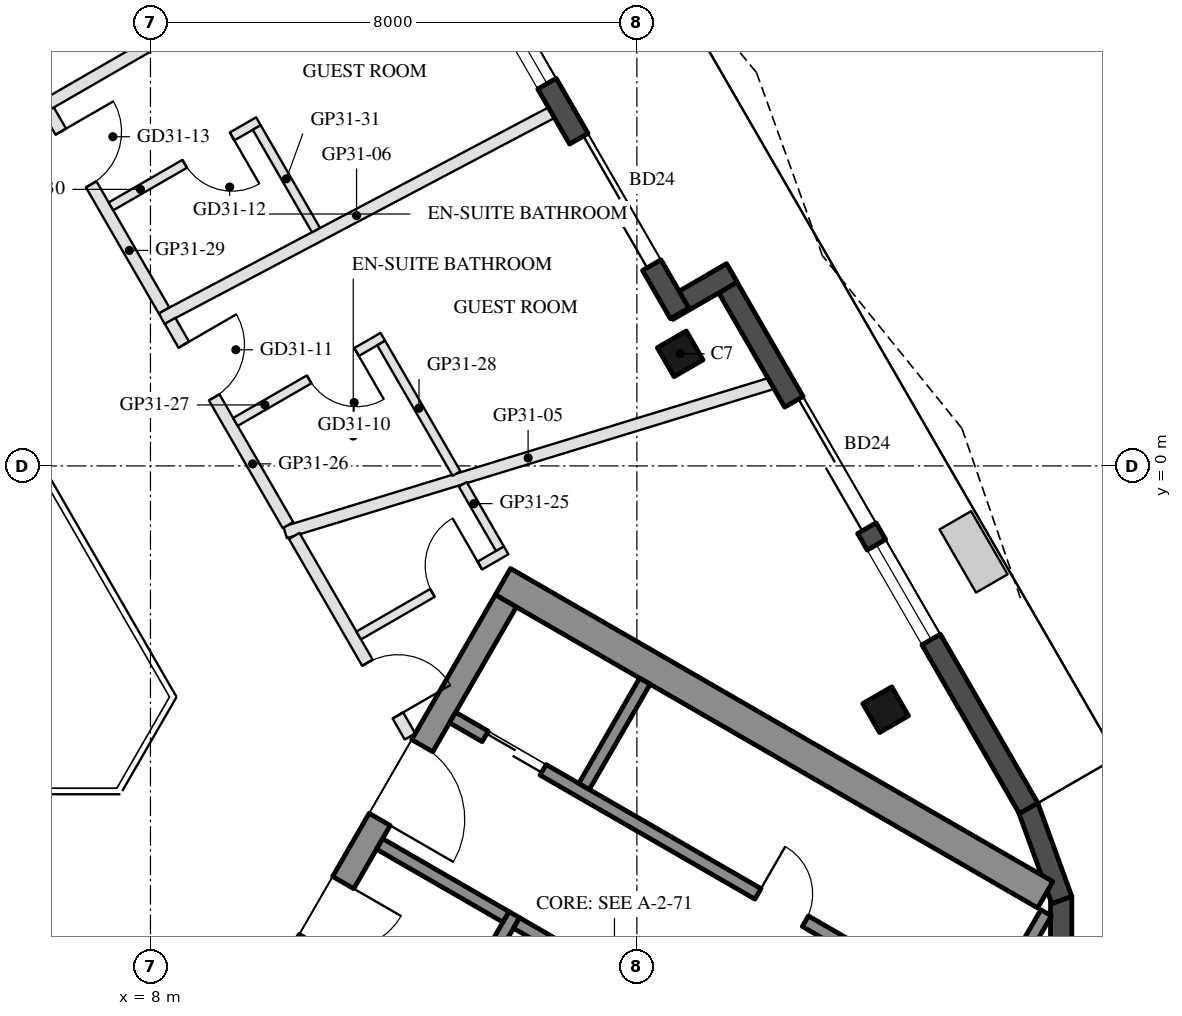
"""IFC4 building model, lengths in metres.
Left out: names, types, materials, properties, quantities, classifications, styles, units other than length and angle.
Written with IfcOpenShell. Run it as: python <this file> out.ifc"""

import sys

from ifc_helpers import new_model, si_unit, direction, frame, frame_2d, origin, origin_2d, place, context, subcontext, project, spatial, rectangle, hollow_rectangle, extrude, boolean, halfspace, element, fill, save


model = new_model("IFC4")
c1 = context("Model", 3, precision=1e-05, world=origin(), true_north=direction((0.0, 1.0)))
c2 = subcontext(c1, "Body", "Model", "MODEL_VIEW")
j1 = project(units=[si_unit("LENGTHUNIT", "METRE"), si_unit("PLANEANGLEUNIT", "RADIAN")], contexts=[c1])
p1 = place(None, origin())
s1 = spatial("IfcSite", under=j1, at=p1, CompositionType="ELEMENT")
p2 = place(p1, origin())
s2 = spatial("IfcBuilding", under=s1, at=p2, CompositionType="ELEMENT")
p3 = place(p2, frame((0.0, 0.0, 305.9)))
s3 = spatial("IfcBuildingStorey", under=s2, at=p3, CompositionType="ELEMENT", Elevation=305.9)
p4 = place(p3, frame((20.091, -4.01, 0.0), z_axis=(0.0, 0.0, 1.0), x_axis=(-0.5, 0.866025403784, 0.0)))
e1 = element("IfcColumn", 1, at=p4, inside=s3, PredefinedType="COLUMN", context=c2, shape_type="SweptSolid", body=[
    boolean("DIFFERENCE", extrude(hollow_rectangle(XDim=0.55, YDim=0.55, WallThickness=0.025, at=origin_2d()), origin(), (0.0, 0.0, 1.0), 3.7), halfspace(frame((0.0, 0.0, 3.66), z_axis=(0.0, 0.0, 1.0), x_axis=(1.0, 0.0, 0.0)), False)),
])
p5 = place(p3, frame((16.711, 1.844, 0.0), z_axis=(0.0, 0.0, 1.0), x_axis=(-0.5, 0.866025403784, 0.0)))
e2 = element("IfcColumn", 2, at=p5, inside=s3, PredefinedType="COLUMN", context=c2, shape_type="SweptSolid", body=[
    boolean("DIFFERENCE", extrude(hollow_rectangle(XDim=0.55, YDim=0.55, WallThickness=0.025, at=origin_2d()), origin(), (0.0, 0.0, 1.0), 3.7), halfspace(frame((0.0, 0.0, 3.666), z_axis=(0.0, 0.0, 1.0), x_axis=(1.0, 0.0, 0.0)), False)),
])
for number, where, z_axis, x_axis in (
    (3, (22.977, -8.714, 0.0), (0.0, 0.0, 1.0), (0.0, 1.0, 0.0)),
    (4, (22.988, -7.14, 0.0), (0.0, 0.0, 1.0), (-0.342, 0.94, 0.0)),
):
    element("IfcWall", number, at=place(p3, frame(where, z_axis=z_axis, x_axis=x_axis)), inside=s3, PredefinedType="SOLIDWALL", context=c2, shape_type="SweptSolid", body=[
        extrude(rectangle(XDim=1.634, YDim=0.35, at=frame_2d((0.817, 0.0))), origin(), (0.0, 0.0, 1.0), 3.55),
    ])
p6 = place(p3, frame((22.442, -5.632, 0.0), z_axis=(0.0, 0.0, 1.0), x_axis=(-0.499983205548, 0.866035099848, 0.0)))
e5 = element("IfcWall", 5, at=p6, inside=s3, PredefinedType="SOLIDWALL", context=c2, shape_type="SweptSolid", body=[
    extrude(rectangle(XDim=10.239, YDim=0.35, at=frame_2d((5.12, 0.0))), origin(), (0.0, 0.0, 1.0), 3.55),
])
p7 = place(p6, frame((5.32, 0.0, 0.0)))
e6 = element("IfcOpeningElement", 6, at=p7, cuts=e5, PredefinedType="OPENING", context=c2, shape_type="SweptSolid", body=[
    extrude(rectangle(XDim=2.4, YDim=2.4, at=frame_2d((1.2, 1.2))), frame((0.0, 0.185, 0.0), z_axis=(0.0, -1.0, 0.0), x_axis=(1.0, 0.0, 0.0)), (0.0, 0.0, 1.0), 0.37),
])
p8 = place(p6, frame((3.205, 0.0, 0.3)))
e7 = element("IfcOpeningElement", 7, at=p8, cuts=e5, PredefinedType="OPENING", context=c2, shape_type="SweptSolid", body=[
    extrude(rectangle(XDim=1.8, YDim=2.65, at=frame_2d((0.9, 1.325))), frame((0.0, 0.185, 0.0), z_axis=(0.0, -1.0, 0.0), x_axis=(1.0, 0.0, 0.0)), (0.0, 0.0, 1.0), 0.37),
])
p9 = place(p3, frame((17.562, 3.172, 0.0), z_axis=(0.0, 0.0, 1.0), x_axis=(-0.866005645448, -0.500034220881, 0.0)))
e8 = element("IfcWall", 8, at=p9, inside=s3, PredefinedType="SOLIDWALL", context=c2, shape_type="SweptSolid", body=[
    extrude(rectangle(XDim=1.22, YDim=0.35, at=frame_2d((0.61, 0.0))), origin(), (0.0, 0.0, 1.0), 3.55),
])
p10 = place(p3, frame((16.703, 2.509, 0.0), z_axis=(0.0, 0.0, 1.0), x_axis=(-0.499975351079, 0.866039634378, 0.0)))
e9 = element("IfcWall", 9, at=p10, inside=s3, PredefinedType="SOLIDWALL", context=c2, shape_type="SweptSolid", body=[
    extrude(rectangle(XDim=5.599, YDim=0.35, at=frame_2d((2.799, 0.0))), origin(), (0.0, 0.0, 1.0), 3.55),
])
p11 = place(p10, frame((0.917, 0.0, 0.0)))
e10 = element("IfcOpeningElement", 10, at=p11, cuts=e9, PredefinedType="OPENING", context=c2, shape_type="SweptSolid", body=[
    extrude(rectangle(XDim=2.4, YDim=2.4, at=frame_2d((1.2, 1.2))), frame((0.0, 0.185, 0.0), z_axis=(0.0, -1.0, 0.0), x_axis=(1.0, 0.0, 0.0)), (0.0, 0.0, 1.0), 0.37),
])
p12 = place(p10, frame((4.363, 0.0, 0.3)))
e11 = element("IfcOpeningElement", 11, at=p12, cuts=e9, PredefinedType="OPENING", context=c2, shape_type="SweptSolid", body=[
    extrude(rectangle(XDim=0.9, YDim=2.65, at=frame_2d((0.45, 1.325))), frame((0.0, 0.185, 0.0), z_axis=(0.0, -1.0, 0.0), x_axis=(1.0, 0.0, 0.0)), (0.0, 0.0, 1.0), 0.37),
])
p13 = place(p3, frame((13.797, -1.903, 0.0), z_axis=(0.0, 0.0, 1.0), x_axis=(0.866027279078, -0.499996751883, 0.0)))
e12 = element("IfcWall", 12, at=p13, inside=s3, PredefinedType="SHEAR", context=c2, shape_type="SweptSolid", body=[
    extrude(rectangle(XDim=10.298, YDim=0.5, at=frame_2d((5.149, 0.0))), origin(), (0.0, 0.0, 1.0), 3.5),
])
p14 = place(p3, frame((8.845, -10.88, 0.0), z_axis=(0.0, 0.0, 1.0), x_axis=(0.500004234368, 0.866022959057, 0.0)))
e13 = element("IfcWall", 13, at=p14, inside=s3, PredefinedType="SHEAR", context=c2, shape_type="SweptSolid", body=[
    extrude(rectangle(XDim=10.0, YDim=0.4, at=frame_2d((5.0, 0.0))), origin(), (0.0, 0.0, 1.0), 3.5),
])
p15 = place(p14, frame((3.55, 0.0, 0.0)))
e14 = element("IfcOpeningElement", 14, at=p15, cuts=e13, PredefinedType="OPENING", context=c2, shape_type="SweptSolid", body=[
    extrude(rectangle(XDim=1.1, YDim=2.1, at=frame_2d((0.55, 1.05))), frame((0.0, 0.21, 0.0), z_axis=(0.0, -1.0, 0.0), x_axis=(1.0, 0.0, 0.0)), (0.0, 0.0, 1.0), 0.42),
])
p16 = place(p14, frame((5.85, 0.0, 0.0)))
e15 = element("IfcOpeningElement", 15, at=p16, cuts=e13, PredefinedType="OPENING", context=c2, shape_type="SweptSolid", body=[
    extrude(rectangle(XDim=1.4, YDim=2.1, at=frame_2d((0.7, 1.05))), frame((0.0, 0.21, 0.0), z_axis=(0.0, -1.0, 0.0), x_axis=(1.0, 0.0, 0.0)), (0.0, 0.0, 1.0), 0.42),
])
p17 = place(p3, frame((12.583, -9.805, 0.0), z_axis=(0.0, 0.0, 1.0), x_axis=(0.49994636267, 0.866056369097, 0.0)))
e16 = element("IfcWall", 16, at=p17, inside=s3, PredefinedType="SHEAR", context=c2, shape_type="SweptSolid", body=[
    extrude(rectangle(XDim=2.8, YDim=0.2, at=frame_2d((1.4, 0.0))), origin(), (0.0, 0.0, 1.0), 3.5),
])
p18 = place(p17, frame((0.7, 0.0, 0.0)))
e17 = element("IfcOpeningElement", 17, at=p18, cuts=e16, PredefinedType="OPENING", context=c2, shape_type="SweptSolid", body=[
    extrude(rectangle(XDim=1.2, YDim=2.1, at=frame_2d((0.6, 1.05))), frame((0.0, 0.11, 0.0), z_axis=(0.0, -1.0, 0.0), x_axis=(1.0, 0.0, 0.0)), (0.0, 0.0, 1.0), 0.22),
])
p19 = place(p3, frame((11.768, -6.217, 0.0), z_axis=(0.0, 0.0, 1.0), x_axis=(0.866050077142, -0.499957262057, 0.0)))
e18 = element("IfcWall", 18, at=p19, inside=s3, PredefinedType="SHEAR", context=c2, shape_type="SweptSolid", body=[
    extrude(rectangle(XDim=2.4, YDim=0.2, at=frame_2d((1.2, 0.0))), origin(), (0.0, 0.0, 1.0), 3.5),
])
p20 = place(p3, frame((14.02, -7.517, 0.0), z_axis=(0.0, 0.0, 1.0), x_axis=(0.866034573852, -0.49998411664, 0.0)))
e19 = element("IfcWall", 19, at=p20, inside=s3, PredefinedType="SHEAR", context=c2, shape_type="SweptSolid", body=[
    extrude(rectangle(XDim=2.8, YDim=0.2, at=frame_2d((1.4, 0.0))), origin(), (0.0, 0.0, 1.0), 3.5),
])
p21 = place(p3, frame((12.968, -4.138, 0.0), z_axis=(0.0, 0.0, 1.0), x_axis=(0.866028328073, -0.49999493495, 0.0)))
e20 = element("IfcWall", 20, at=p21, inside=s3, PredefinedType="SHEAR", context=c2, shape_type="SweptSolid", body=[
    extrude(rectangle(XDim=10.16, YDim=0.2, at=frame_2d((5.08, 0.0))), origin(), (0.0, 0.0, 1.0), 3.5),
])
p22 = place(p21, frame((0.62, 0.0, 0.0)))
e21 = element("IfcOpeningElement", 21, at=p22, cuts=e20, PredefinedType="OPENING", context=c2, shape_type="SweptSolid", body=[
    extrude(rectangle(XDim=1.1, YDim=2.1, at=frame_2d((0.55, 1.05))), frame((0.0, 0.11, 0.0), z_axis=(0.0, -1.0, 0.0), x_axis=(1.0, 0.0, 0.0)), (0.0, 0.0, 1.0), 0.22),
])
p23 = place(p21, frame((5.8, 0.0, 0.0)))
e22 = element("IfcOpeningElement", 22, at=p23, cuts=e20, PredefinedType="OPENING", context=c2, shape_type="SweptSolid", body=[
    extrude(rectangle(XDim=0.9, YDim=2.1, at=frame_2d((0.45, 1.05))), frame((0.0, 0.11, 0.0), z_axis=(0.0, -1.0, 0.0), x_axis=(1.0, 0.0, 0.0)), (0.0, 0.0, 1.0), 0.22),
])
for number, where, z_axis, x_axis in (
    (23, (15.131, -5.272, 0.0), (0.0, 0.0, 1.0), (0.5, 0.866, 0.0)),
    (24, (21.73, -9.082, 0.0), (0.0, 0.0, 1.0), (0.5, 0.866, 0.0)),
):
    element("IfcWall", number, at=place(p3, frame(where, z_axis=z_axis, x_axis=x_axis)), inside=s3, PredefinedType="SHEAR", context=c2, shape_type="SweptSolid", body=[
        extrude(rectangle(XDim=2.0, YDim=0.2, at=frame_2d((1.0, 0.0))), origin(), (0.0, 0.0, 1.0), 3.5),
    ])
p24 = place(p3, frame((18.206, 1.355, 0.0), z_axis=(0.0, 0.0, 1.0), x_axis=(-0.956150885444, -0.292874519658, 0.0)))
e25 = element("IfcWall", 25, at=p24, inside=s3, PredefinedType="PARTITIONING", context=c2, shape_type="SweptSolid", body=[
    extrude(rectangle(XDim=8.358, YDim=0.2, at=frame_2d((4.179, 0.0))), origin(), (0.0, 0.0, 1.0), 3.1),
])
p25 = place(p3, frame((14.595, 5.81, 0.0), z_axis=(0.0, 0.0, 1.0), x_axis=(-0.884286267242, -0.46694517619, 0.0)))
e26 = element("IfcWall", 26, at=p25, inside=s3, PredefinedType="PARTITIONING", context=c2, shape_type="SweptSolid", body=[
    extrude(rectangle(XDim=7.25, YDim=0.2, at=frame_2d((3.625, 0.0))), origin(), (0.0, 0.0, 1.0), 3.1),
])
p26 = place(p3, frame((13.241, 9.954, 0.0), z_axis=(0.0, 0.0, 1.0), x_axis=(-0.866028345359, -0.499994905008, 0.0)))
e27 = element("IfcWall", 27, at=p26, inside=s3, PredefinedType="PARTITIONING", context=c2, shape_type="SweptSolid", body=[
    extrude(rectangle(XDim=8.145, YDim=0.2, at=frame_2d((4.072, 0.0))), origin(), (0.0, 0.0, 1.0), 3.1),
])
p27 = place(p3, frame((10.365, -1.152, 0.0), z_axis=(0.0, 0.0, 1.0), x_axis=(0.499999897272, -0.866025463095, 0.0)))
e28 = element("IfcWall", 28, at=p27, inside=s3, PredefinedType="PARTITIONING", context=c2, shape_type="SweptSolid", body=[
    extrude(rectangle(XDim=3.809, YDim=0.2, at=frame_2d((1.904, 0.0))), origin(), (0.0, 0.0, 1.0), 3.1),
])
p28 = place(p27, frame((2.409, 0.0, 0.0)))
e29 = element("IfcOpeningElement", 29, at=p28, cuts=e28, PredefinedType="OPENING", context=c2, shape_type="SweptSolid", body=[
    extrude(rectangle(XDim=1.0, YDim=2.1, at=frame_2d((0.5, 1.05))), frame((0.0, 0.11, 0.0), z_axis=(0.0, -1.0, 0.0), x_axis=(1.0, 0.0, 0.0)), (0.0, 0.0, 1.0), 0.22),
])
p29 = place(p3, frame((11.425, -2.789, 0.0), z_axis=(0.0, 0.0, 1.0), x_axis=(0.865996816683, 0.500049511043, 0.0)))
e30 = element("IfcWall", 30, at=p29, inside=s3, PredefinedType="PARTITIONING", context=c2, shape_type="SweptSolid", body=[
    extrude(rectangle(XDim=2.8, YDim=0.15, at=frame_2d((1.4, 0.0))), origin(), (0.0, 0.0, 1.0), 3.55),
])
p30 = place(p29, frame((1.4, 0.0, 0.0)))
e31 = element("IfcOpeningElement", 31, at=p30, cuts=e30, PredefinedType="OPENING", context=c2, shape_type="SweptSolid", body=[
    extrude(rectangle(XDim=0.9, YDim=2.1, at=frame_2d((0.45, 1.05))), frame((0.0, 0.085, 0.0), z_axis=(0.0, -1.0, 0.0), x_axis=(1.0, 0.0, 0.0)), (0.0, 0.0, 1.0), 0.17),
])
p31 = place(p3, frame((13.747, -1.361, 0.0), z_axis=(0.0, 0.0, 1.0), x_axis=(-0.499941460885, 0.86605919872, 0.0)))
e32 = element("IfcWall", 32, at=p31, inside=s3, PredefinedType="PARTITIONING", context=c2, shape_type="SweptSolid", body=[
    extrude(rectangle(XDim=1.222, YDim=0.15, at=frame_2d((0.611, 0.0))), origin(), (0.0, 0.0, 1.0), 3.1),
])
p32 = place(p3, frame((8.323, 2.385, 0.0), z_axis=(0.0, 0.0, 1.0), x_axis=(0.499998569178, -0.866026229868, 0.0)))
e33 = element("IfcWall", 33, at=p32, inside=s3, PredefinedType="PARTITIONING", context=c2, shape_type="SweptSolid", body=[
    extrude(rectangle(XDim=3.878, YDim=0.2, at=frame_2d((1.939, 0.0))), origin(), (0.0, 0.0, 1.0), 3.1),
])
p33 = place(p32, frame((0.451, 0.0, 0.0)))
e34 = element("IfcOpeningElement", 34, at=p33, cuts=e33, PredefinedType="OPENING", context=c2, shape_type="SweptSolid", body=[
    extrude(rectangle(XDim=1.0, YDim=2.1, at=frame_2d((0.5, 1.05))), frame((0.0, 0.11, 0.0), z_axis=(0.0, -1.0, 0.0), x_axis=(1.0, 0.0, 0.0)), (0.0, 0.0, 1.0), 0.22),
])
p34 = place(p3, frame((11.822, 2.123, 0.0), z_axis=(0.0, 0.0, 1.0), x_axis=(-0.865996816683, -0.500049511043, 0.0)))
e35 = element("IfcWall", 35, at=p34, inside=s3, PredefinedType="PARTITIONING", context=c2, shape_type="SweptSolid", body=[
    extrude(rectangle(XDim=2.8, YDim=0.15, at=frame_2d((1.4, 0.0))), origin(), (0.0, 0.0, 1.0), 3.55),
])
p35 = place(p34, frame((0.5, 0.0, 0.0)))
e36 = element("IfcOpeningElement", 36, at=p35, cuts=e35, PredefinedType="OPENING", context=c2, shape_type="SweptSolid", body=[
    extrude(rectangle(XDim=0.9, YDim=2.1, at=frame_2d((0.45, 1.05))), frame((0.0, 0.085, 0.0), z_axis=(0.0, -1.0, 0.0), x_axis=(1.0, 0.0, 0.0)), (0.0, 0.0, 1.0), 0.17),
])
p36 = place(p3, frame((13.034, -0.125, 0.0), z_axis=(0.0, 0.0, 1.0), x_axis=(-0.499975499923, 0.866039548448, 0.0)))
e37 = element("IfcWall", 37, at=p36, inside=s3, PredefinedType="PARTITIONING", context=c2, shape_type="SweptSolid", body=[
    extrude(rectangle(XDim=2.478, YDim=0.15, at=frame_2d((1.239, 0.0))), origin(), (0.0, 0.0, 1.0), 3.55),
])
p37 = place(p3, frame((6.325, 5.845, 0.0), z_axis=(0.0, 0.0, 1.0), x_axis=(0.499971120268, -0.866042076863, 0.0)))
e38 = element("IfcWall", 38, at=p37, inside=s3, PredefinedType="PARTITIONING", context=c2, shape_type="SweptSolid", body=[
    extrude(rectangle(XDim=3.796, YDim=0.2, at=frame_2d((1.898, 0.0))), origin(), (0.0, 0.0, 1.0), 3.1),
])
p38 = place(p37, frame((0.402, 0.0, 0.0)))
e39 = element("IfcOpeningElement", 39, at=p38, cuts=e38, PredefinedType="OPENING", context=c2, shape_type="SweptSolid", body=[
    extrude(rectangle(XDim=1.0, YDim=2.1, at=frame_2d((0.5, 1.05))), frame((0.0, 0.11, 0.0), z_axis=(0.0, -1.0, 0.0), x_axis=(1.0, 0.0, 0.0)), (0.0, 0.0, 1.0), 0.22),
])
p39 = place(p3, frame((9.775, 5.668, 0.0), z_axis=(0.0, 0.0, 1.0), x_axis=(-0.865996816683, -0.500049511043, 0.0)))
e40 = element("IfcWall", 40, at=p39, inside=s3, PredefinedType="PARTITIONING", context=c2, shape_type="SweptSolid", body=[
    extrude(rectangle(XDim=2.8, YDim=0.15, at=frame_2d((1.4, 0.0))), origin(), (0.0, 0.0, 1.0), 3.1),
])
p40 = place(p39, frame((0.5, 0.0, 0.0)))
e41 = element("IfcOpeningElement", 41, at=p40, cuts=e40, PredefinedType="OPENING", context=c2, shape_type="SweptSolid", body=[
    extrude(rectangle(XDim=0.9, YDim=2.1, at=frame_2d((0.45, 1.05))), frame((0.0, 0.085, 0.0), z_axis=(0.0, -1.0, 0.0), x_axis=(1.0, 0.0, 0.0)), (0.0, 0.0, 1.0), 0.17),
])
p41 = place(p3, frame((10.722, 3.878, 0.0), z_axis=(0.0, 0.0, 1.0), x_axis=(-0.49992486272, 0.866068779967, 0.0)))
e42 = element("IfcWall", 42, at=p41, inside=s3, PredefinedType="PARTITIONING", context=c2, shape_type="SweptSolid", body=[
    extrude(rectangle(XDim=1.949, YDim=0.15, at=frame_2d((0.975, 0.0))), origin(), (0.0, 0.0, 1.0), 3.1),
])
p42 = place(p7, frame((2.4, 0.0, 0.0), z_axis=(0.0, 0.0, 1.0), x_axis=(-1.0, 0.0, 0.0)))
e43 = element("IfcDoor", 43, at=p42, inside=s3, OperationType="SLIDING_TO_LEFT", PredefinedType="DOOR", context=c2, shape_type="SweptSolid", body=[
    extrude(rectangle(XDim=2.4, YDim=2.4, at=frame_2d((1.2, 1.2))), frame((0.0, 0.025, 0.0), z_axis=(0.0, -1.0, 0.0), x_axis=(1.0, 0.0, 0.0)), (0.0, 0.0, 1.0), 0.05),
])
fill(e6, e43)
p43 = place(p8, origin())
e44 = element("IfcWindow", 44, at=p43, inside=s3, PartitioningType="SINGLE_PANEL", PredefinedType="WINDOW", context=c2, shape_type="SweptSolid", body=[
    extrude(rectangle(XDim=1.8, YDim=2.65, at=frame_2d((0.9, 1.325))), frame((0.0, 0.03, 0.0), z_axis=(0.0, -1.0, 0.0), x_axis=(1.0, 0.0, 0.0)), (0.0, 0.0, 1.0), 0.06),
])
fill(e7, e44)
p44 = place(p11, frame((2.4, 0.0, 0.0), z_axis=(0.0, 0.0, 1.0), x_axis=(-1.0, 0.0, 0.0)))
e45 = element("IfcDoor", 45, at=p44, inside=s3, OperationType="SLIDING_TO_LEFT", PredefinedType="DOOR", context=c2, shape_type="SweptSolid", body=[
    extrude(rectangle(XDim=2.4, YDim=2.4, at=frame_2d((1.2, 1.2))), frame((0.0, 0.025, 0.0), z_axis=(0.0, -1.0, 0.0), x_axis=(1.0, 0.0, 0.0)), (0.0, 0.0, 1.0), 0.05),
])
fill(e10, e45)
p45 = place(p12, origin())
e46 = element("IfcWindow", 46, at=p45, inside=s3, PartitioningType="SINGLE_PANEL", PredefinedType="WINDOW", context=c2, shape_type="SweptSolid", body=[
    extrude(rectangle(XDim=0.9, YDim=2.65, at=frame_2d((0.45, 1.325))), frame((0.0, 0.03, 0.0), z_axis=(0.0, -1.0, 0.0), x_axis=(1.0, 0.0, 0.0)), (0.0, 0.0, 1.0), 0.06),
])
fill(e11, e46)
p46 = place(p22, origin())
e47 = element("IfcDoor", 47, at=p46, inside=s3, OperationType="DOUBLE_DOOR_SLIDING", PredefinedType="DOOR", context=c2, shape_type="SweptSolid", body=[
    extrude(rectangle(XDim=1.1, YDim=2.1, at=frame_2d((0.55, 1.05))), frame((0.0, 0.025, 0.0), z_axis=(0.0, -1.0, 0.0), x_axis=(1.0, 0.0, 0.0)), (0.0, 0.0, 1.0), 0.05),
])
fill(e21, e47)
p47 = place(p23, origin())
e48 = element("IfcDoor", 48, at=p47, inside=s3, OperationType="SINGLE_SWING_LEFT", PredefinedType="DOOR", context=c2, shape_type="SweptSolid", body=[
    extrude(rectangle(XDim=0.9, YDim=2.1, at=frame_2d((0.45, 1.05))), frame((0.0, 0.025, 0.0), z_axis=(0.0, -1.0, 0.0), x_axis=(1.0, 0.0, 0.0)), (0.0, 0.0, 1.0), 0.05),
])
fill(e22, e48)
p48 = place(p15, frame((1.1, 0.0, 0.0), z_axis=(0.0, 0.0, 1.0), x_axis=(-1.0, 0.0, 0.0)))
e49 = element("IfcDoor", 49, at=p48, inside=s3, OperationType="SINGLE_SWING_LEFT", PredefinedType="DOOR", context=c2, shape_type="SweptSolid", body=[
    extrude(rectangle(XDim=1.1, YDim=2.1, at=frame_2d((0.55, 1.05))), frame((0.0, 0.025, 0.0), z_axis=(0.0, -1.0, 0.0), x_axis=(1.0, 0.0, 0.0)), (0.0, 0.0, 1.0), 0.05),
])
fill(e14, e49)
p49 = place(p16, frame((1.4, 0.0, 0.0), z_axis=(0.0, 0.0, 1.0), x_axis=(-1.0, 0.0, 0.0)))
e50 = element("IfcDoor", 50, at=p49, inside=s3, OperationType="DOUBLE_DOOR_SINGLE_SWING", PredefinedType="DOOR", context=c2, shape_type="SweptSolid", body=[
    extrude(rectangle(XDim=1.4, YDim=2.1, at=frame_2d((0.7, 1.05))), frame((0.0, 0.025, 0.0), z_axis=(0.0, -1.0, 0.0), x_axis=(1.0, 0.0, 0.0)), (0.0, 0.0, 1.0), 0.05),
])
fill(e15, e50)
p50 = place(p30, origin())
e51 = element("IfcDoor", 51, at=p50, inside=s3, OperationType="SINGLE_SWING_RIGHT", PredefinedType="DOOR", context=c2, shape_type="SweptSolid", body=[
    extrude(rectangle(XDim=0.9, YDim=2.1, at=frame_2d((0.45, 1.05))), frame((0.0, 0.025, 0.0), z_axis=(0.0, -1.0, 0.0), x_axis=(1.0, 0.0, 0.0)), (0.0, 0.0, 1.0), 0.05),
])
fill(e31, e51)
p51 = place(p28, origin())
e52 = element("IfcDoor", 52, at=p51, inside=s3, OperationType="SINGLE_SWING_RIGHT", PredefinedType="DOOR", context=c2, shape_type="SweptSolid", body=[
    extrude(rectangle(XDim=1.0, YDim=2.1, at=frame_2d((0.5, 1.05))), frame((0.0, 0.025, 0.0), z_axis=(0.0, -1.0, 0.0), x_axis=(1.0, 0.0, 0.0)), (0.0, 0.0, 1.0), 0.05),
])
fill(e29, e52)
p52 = place(p35, origin())
e53 = element("IfcDoor", 53, at=p52, inside=s3, OperationType="SINGLE_SWING_LEFT", PredefinedType="DOOR", context=c2, shape_type="SweptSolid", body=[
    extrude(rectangle(XDim=0.9, YDim=2.1, at=frame_2d((0.45, 1.05))), frame((0.0, 0.025, 0.0), z_axis=(0.0, -1.0, 0.0), x_axis=(1.0, 0.0, 0.0)), (0.0, 0.0, 1.0), 0.05),
])
fill(e36, e53)
p53 = place(p33, origin())
e54 = element("IfcDoor", 54, at=p53, inside=s3, OperationType="SINGLE_SWING_LEFT", PredefinedType="DOOR", context=c2, shape_type="SweptSolid", body=[
    extrude(rectangle(XDim=1.0, YDim=2.1, at=frame_2d((0.5, 1.05))), frame((0.0, 0.025, 0.0), z_axis=(0.0, -1.0, 0.0), x_axis=(1.0, 0.0, 0.0)), (0.0, 0.0, 1.0), 0.05),
])
fill(e34, e54)
p54 = place(p40, origin())
e55 = element("IfcDoor", 55, at=p54, inside=s3, OperationType="SINGLE_SWING_LEFT", PredefinedType="DOOR", context=c2, shape_type="SweptSolid", body=[
    extrude(rectangle(XDim=0.9, YDim=2.1, at=frame_2d((0.45, 1.05))), frame((0.0, 0.025, 0.0), z_axis=(0.0, -1.0, 0.0), x_axis=(1.0, 0.0, 0.0)), (0.0, 0.0, 1.0), 0.05),
])
fill(e41, e55)
p55 = place(p38, origin())
e56 = element("IfcDoor", 56, at=p55, inside=s3, OperationType="SINGLE_SWING_LEFT", PredefinedType="DOOR", context=c2, shape_type="SweptSolid", body=[
    extrude(rectangle(XDim=1.0, YDim=2.1, at=frame_2d((0.5, 1.05))), frame((0.0, 0.025, 0.0), z_axis=(0.0, -1.0, 0.0), x_axis=(1.0, 0.0, 0.0)), (0.0, 0.0, 1.0), 0.05),
])
fill(e39, e56)
save(model, sys.argv[1])
